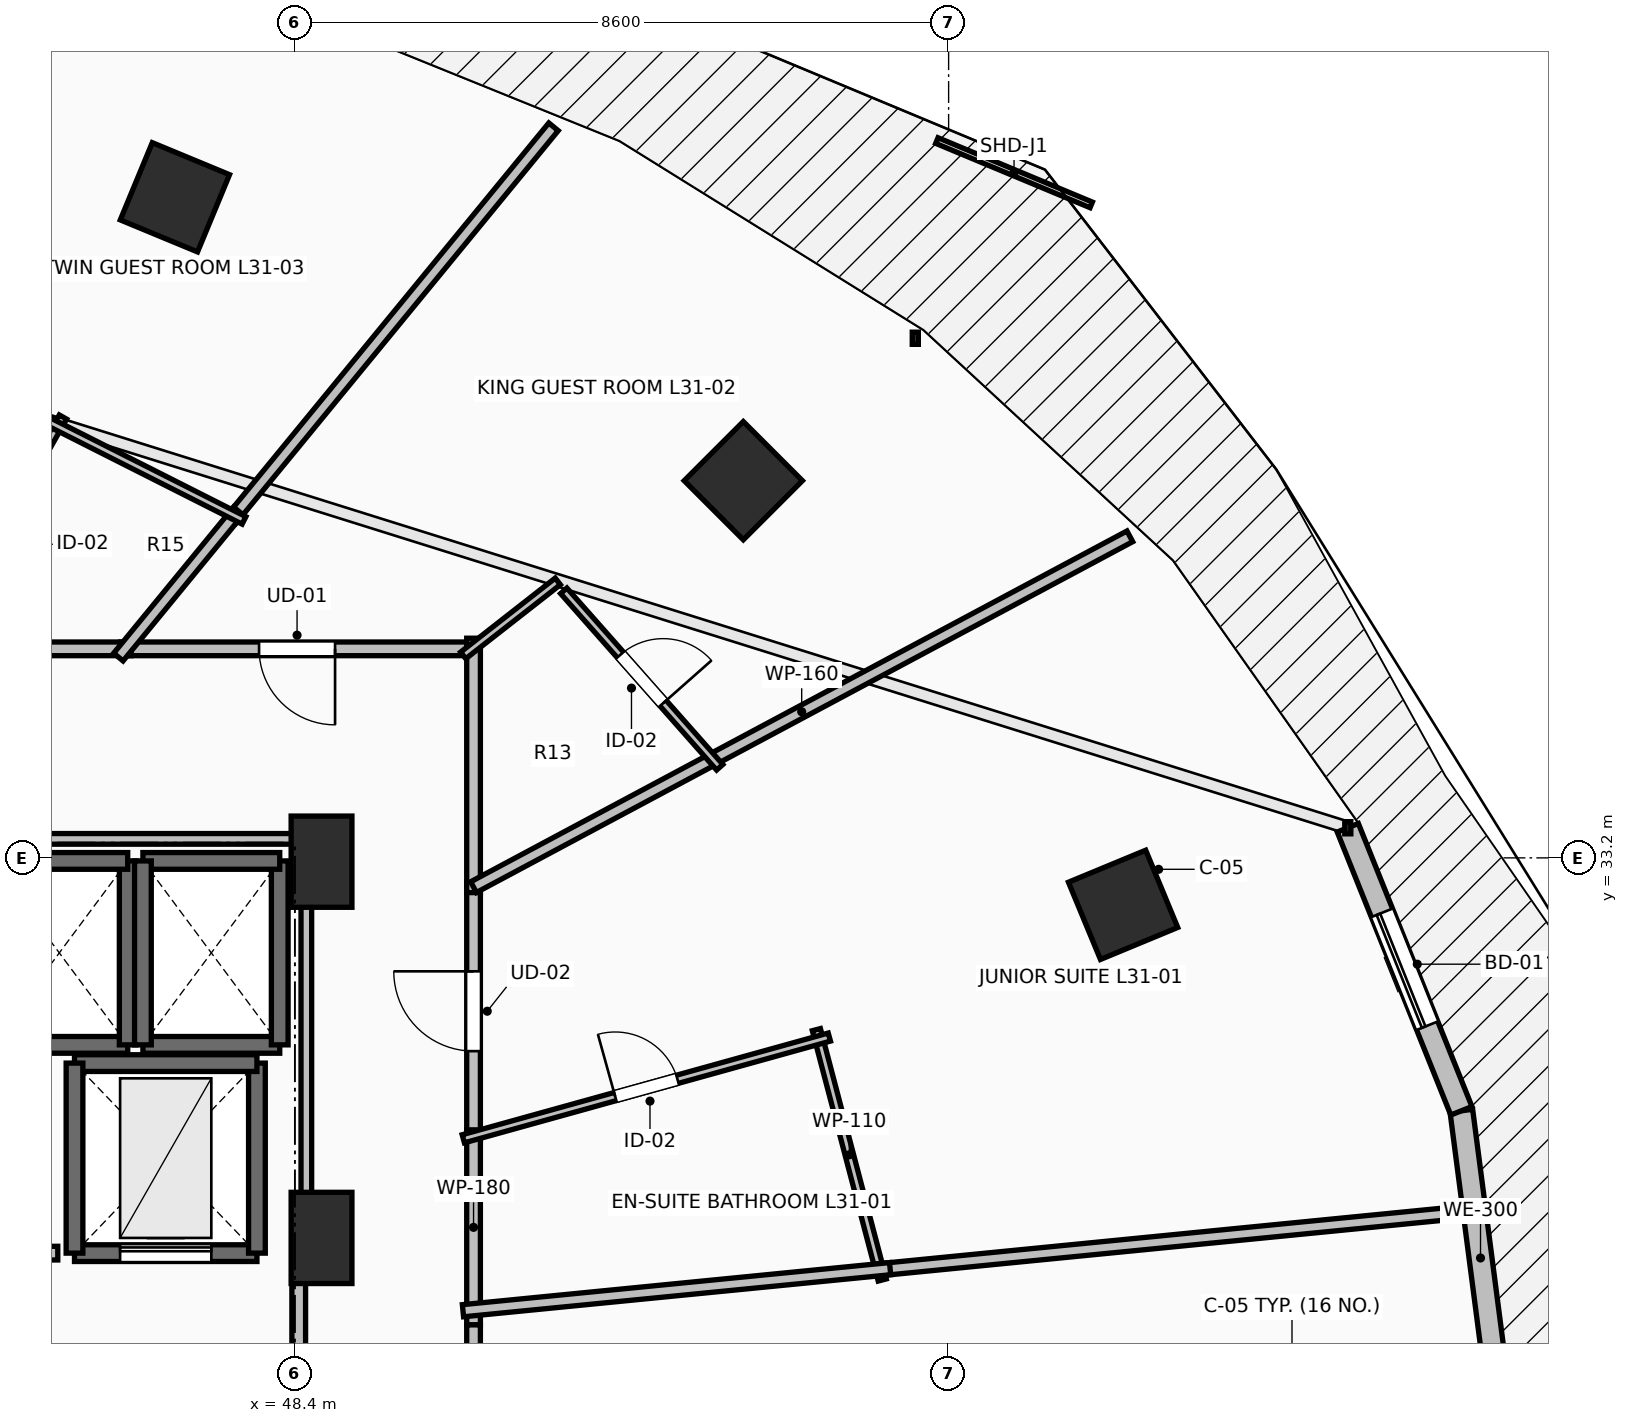
"""IFC4 building model, lengths in metres.
Left out: names, types, materials, properties, quantities, classifications, styles, units other than length and angle.
Written with IfcOpenShell. Run it as: python <this file> out.ifc"""

import sys

from ifc_helpers import new_model, si_unit, direction, frame, frame_2d, origin, origin_2d, place, context, subcontext, project, spatial, rectangle, extrude, element, fill, save


model = new_model("IFC4")
c1 = context("Model", 3, precision=1e-05, world=origin(), true_north=direction((0.0, 1.0)))
c2 = subcontext(c1, "Body", "Model", "MODEL_VIEW")
j1 = project(units=[si_unit("LENGTHUNIT", "METRE"), si_unit("PLANEANGLEUNIT", "RADIAN")], contexts=[c1])
p1 = place(None, origin())
s1 = spatial("IfcSite", under=j1, at=p1, CompositionType="ELEMENT")
p2 = place(p1, origin())
s2 = spatial("IfcBuilding", under=s1, at=p2, CompositionType="ELEMENT")
p3 = place(p2, frame((0.0, 0.0, 117.3)))
s3 = spatial("IfcBuildingStorey", under=s2, at=p3, CompositionType="ELEMENT", Elevation=117.3)
for number, where, z_axis, x_axis in (
    (1, (59.295, 32.582, 0.0), (0.0, 0.0, 1.0), (0.924, 0.383, 0.0)),
    (2, (54.299, 38.162, 0.0), (0.0, 0.0, 1.0), (0.707, 0.707, 0.0)),
    (3, (46.821, 41.891, 0.0), (0.0, 0.0, 1.0), (0.383, 0.924, 0.0)),
):
    element("IfcColumn", number, at=place(p3, frame(where, z_axis=z_axis, x_axis=x_axis)), inside=s3, PredefinedType="COLUMN", context=c2, shape_type="SweptSolid", body=[
        extrude(rectangle(XDim=1.1, YDim=1.1, at=origin_2d()), origin(), (0.0, 0.0, 1.0), 3.5),
    ])
for number, where, z_axis, x_axis in (
    (4, (48.75, 33.15, 0.0), (0.0, 0.0, 1.0), (1.0, 0.0, 0.0)),
    (5, (48.75, 28.2, 0.0), (0.0, 0.0, 1.0), (1.0, 0.0, 0.0)),
):
    element("IfcColumn", number, at=place(p3, frame(where, z_axis=z_axis, x_axis=x_axis)), inside=s3, PredefinedType="PILASTER", context=c2, shape_type="SweptSolid", body=[
        extrude(rectangle(XDim=0.8, YDim=1.2, at=origin_2d()), origin(), (0.0, 0.0, 1.0), 3.5),
    ])
p4 = place(p3, frame((64.25, 26.0, 0.0), z_axis=(0.0, 0.0, 1.0), x_axis=(-0.129157444793, 0.991624099372, 0.0)))
e6 = element("IfcWall", 6, at=p4, inside=s3, PredefinedType="STANDARD", context=c2, shape_type="SweptSolid", body=[
    extrude(rectangle(XDim=3.905, YDim=0.3, at=frame_2d((1.953, 0.0))), origin(), (0.0, 0.0, 1.0), 3.24),
])
p5 = place(p3, frame((63.746, 29.873, 0.0), z_axis=(0.0, 0.0, 1.0), x_axis=(-0.372345205928, 0.92809430966, 0.0)))
e7 = element("IfcWall", 7, at=p5, inside=s3, PredefinedType="STANDARD", context=c2, shape_type="SweptSolid", body=[
    extrude(rectangle(XDim=4.012, YDim=0.3, at=frame_2d((2.006, 0.0))), origin(), (0.0, 0.0, 1.0), 3.24),
])
p6 = place(p5, frame((1.206, 0.0, 0.0)))
e8 = element("IfcOpeningElement", 8, at=p6, cuts=e7, PredefinedType="OPENING", context=c2, shape_type="SweptSolid", body=[
    extrude(rectangle(XDim=1.6, YDim=2.3, at=frame_2d((0.8, 1.15))), frame((0.0, 0.165, 0.0), z_axis=(0.0, -1.0, 0.0), x_axis=(1.0, 0.0, 0.0)), (0.0, 0.0, 1.0), 0.33),
])
p7 = place(p3, frame((44.4, 30.74, 0.0), z_axis=(0.0, 0.0, 1.0), x_axis=(1.0, 0.0, 0.0)))
e9 = element("IfcWall", 9, at=p7, inside=s3, PredefinedType="SOLIDWALL", context=c2, shape_type="SweptSolid", body=[
    extrude(rectangle(XDim=1.8, YDim=0.22, at=frame_2d((0.9, 0.0))), origin(), (0.0, 0.0, 1.0), 3.24),
])
p8 = place(p3, frame((46.2, 30.74, 0.0), z_axis=(0.0, 0.0, 1.0), x_axis=(0.0, 1.0, 0.0)))
e10 = element("IfcWall", 10, at=p8, inside=s3, PredefinedType="SOLIDWALL", context=c2, shape_type="SweptSolid", body=[
    extrude(rectangle(XDim=2.42, YDim=0.22, at=frame_2d((1.21, 0.0))), origin(), (0.0, 0.0, 1.0), 3.24),
])
for number, where, z_axis, x_axis in (
    (11, (46.2, 33.16, 0.0), (0.0, 0.0, 1.0), (-1.0, 0.0, 0.0)),
    (12, (46.4, 30.74, 0.0), (0.0, 0.0, 1.0), (1.0, 0.0, 0.0)),
):
    element("IfcWall", number, at=place(p3, frame(where, z_axis=z_axis, x_axis=x_axis)), inside=s3, PredefinedType="SOLIDWALL", context=c2, shape_type="SweptSolid", body=[
        extrude(rectangle(XDim=1.8, YDim=0.22, at=frame_2d((0.9, 0.0))), origin(), (0.0, 0.0, 1.0), 3.24),
    ])
p9 = place(p3, frame((48.2, 30.74, 0.0), z_axis=(0.0, 0.0, 1.0), x_axis=(0.0, 1.0, 0.0)))
e13 = element("IfcWall", 13, at=p9, inside=s3, PredefinedType="SOLIDWALL", context=c2, shape_type="SweptSolid", body=[
    extrude(rectangle(XDim=2.42, YDim=0.22, at=frame_2d((1.21, 0.0))), origin(), (0.0, 0.0, 1.0), 3.24),
])
p10 = place(p3, frame((48.2, 33.16, 0.0), z_axis=(0.0, 0.0, 1.0), x_axis=(-1.0, 0.0, 0.0)))
e14 = element("IfcWall", 14, at=p10, inside=s3, PredefinedType="SOLIDWALL", context=c2, shape_type="SweptSolid", body=[
    extrude(rectangle(XDim=1.8, YDim=0.22, at=frame_2d((0.9, 0.0))), origin(), (0.0, 0.0, 1.0), 3.24),
])
p11 = place(p3, frame((46.4, 33.16, 0.0), z_axis=(0.0, 0.0, 1.0), x_axis=(0.0, -1.0, 0.0)))
e15 = element("IfcWall", 15, at=p11, inside=s3, PredefinedType="SOLIDWALL", context=c2, shape_type="SweptSolid", body=[
    extrude(rectangle(XDim=2.42, YDim=0.22, at=frame_2d((1.21, 0.0))), origin(), (0.0, 0.0, 1.0), 3.24),
])
p12 = place(p3, frame((45.5, 28.0, 0.0), z_axis=(0.0, 0.0, 1.0), x_axis=(1.0, 0.0, 0.0)))
e16 = element("IfcWall", 16, at=p12, inside=s3, PredefinedType="SHEAR", context=c2, shape_type="SweptSolid", body=[
    extrude(rectangle(XDim=2.4, YDim=0.22, at=frame_2d((1.2, 0.0))), origin(), (0.0, 0.0, 1.0), 3.24),
])
p13 = place(p12, frame((0.6, 0.0, 0.0)))
e17 = element("IfcOpeningElement", 17, at=p13, cuts=e16, PredefinedType="OPENING", context=c2, shape_type="SweptSolid", body=[
    extrude(rectangle(XDim=1.2, YDim=2.2, at=frame_2d((0.6, 1.1))), frame((0.0, 0.125, 0.0), z_axis=(0.0, -1.0, 0.0), x_axis=(1.0, 0.0, 0.0)), (0.0, 0.0, 1.0), 0.25),
])
p14 = place(p3, frame((47.9, 28.0, 0.0), z_axis=(0.0, 0.0, 1.0), x_axis=(0.0, 1.0, 0.0)))
e18 = element("IfcWall", 18, at=p14, inside=s3, PredefinedType="SHEAR", context=c2, shape_type="SweptSolid", body=[
    extrude(rectangle(XDim=2.5, YDim=0.22, at=frame_2d((1.25, 0.0))), origin(), (0.0, 0.0, 1.0), 3.24),
])
p15 = place(p3, frame((47.9, 30.5, 0.0), z_axis=(0.0, 0.0, 1.0), x_axis=(-1.0, 0.0, 0.0)))
e19 = element("IfcWall", 19, at=p15, inside=s3, PredefinedType="SHEAR", context=c2, shape_type="SweptSolid", body=[
    extrude(rectangle(XDim=2.4, YDim=0.22, at=frame_2d((1.2, 0.0))), origin(), (0.0, 0.0, 1.0), 3.24),
])
p16 = place(p3, frame((45.5, 30.5, 0.0), z_axis=(0.0, 0.0, 1.0), x_axis=(0.0, -1.0, 0.0)))
e20 = element("IfcWall", 20, at=p16, inside=s3, PredefinedType="SHEAR", context=c2, shape_type="SweptSolid", body=[
    extrude(rectangle(XDim=2.5, YDim=0.22, at=frame_2d((1.25, 0.0))), origin(), (0.0, 0.0, 1.0), 3.24),
])
p17 = place(p3, frame((48.45, 23.95, 0.0), z_axis=(0.0, 0.0, 1.0), x_axis=(0.0, 1.0, 0.0)))
e21 = element("IfcWall", 21, at=p17, inside=s3, PredefinedType="PARTITIONING", context=c2, shape_type="SweptSolid", body=[
    extrude(rectangle(XDim=4.05, YDim=0.18, at=frame_2d((2.025, 0.0))), origin(), (0.0, 0.0, 1.0), 3.24),
])
p18 = place(p17, frame((1.425, 0.0, 0.0)))
e22 = element("IfcOpeningElement", 22, at=p18, cuts=e21, PredefinedType="OPENING", context=c2, shape_type="SweptSolid", body=[
    extrude(rectangle(XDim=1.2, YDim=2.15, at=frame_2d((0.6, 1.075))), frame((0.0, 0.105, 0.0), z_axis=(0.0, -1.0, 0.0), x_axis=(1.0, 0.0, 0.0)), (0.0, 0.0, 1.0), 0.21),
])
p19 = place(p3, frame((50.75, 29.482, 0.0), z_axis=(0.0, 0.0, 1.0), x_axis=(0.0, 1.0, 0.0)))
e23 = element("IfcWall", 23, at=p19, inside=s3, PredefinedType="PARTITIONING", context=c2, shape_type="SweptSolid", body=[
    extrude(rectangle(XDim=3.401, YDim=0.18, at=frame_2d((1.701, 0.0))), origin(), (0.0, 0.0, 1.0), 2.432),
])
p20 = place(p19, frame((1.176, 0.0, 0.0)))
e24 = element("IfcOpeningElement", 24, at=p20, cuts=e23, PredefinedType="OPENING", context=c2, shape_type="SweptSolid", body=[
    extrude(rectangle(XDim=1.05, YDim=2.2, at=frame_2d((0.525, 1.1))), frame((0.0, 0.105, 0.0), z_axis=(0.0, -1.0, 0.0), x_axis=(1.0, 0.0, 0.0)), (0.0, 0.0, 1.0), 0.21),
])
p21 = place(p3, frame((50.75, 27.056, 0.0), z_axis=(0.0, 0.0, 1.0), x_axis=(0.0, 1.0, 0.0)))
e25 = element("IfcWall", 25, at=p21, inside=s3, PredefinedType="PARTITIONING", context=c2, shape_type="SweptSolid", body=[
    extrude(rectangle(XDim=2.566, YDim=0.18, at=frame_2d((1.283, 0.0))), origin(), (0.0, 0.0, 1.0), 2.432),
])
p22 = place(p3, frame((50.75, 35.95, 0.0), z_axis=(0.0, 0.0, 1.0), x_axis=(-1.0, 0.0, 0.0)))
e26 = element("IfcWall", 26, at=p22, inside=s3, PredefinedType="PARTITIONING", context=c2, shape_type="SweptSolid", body=[
    extrude(rectangle(XDim=4.644, YDim=0.18, at=frame_2d((2.322, 0.0))), origin(), (0.0, 0.0, 1.0), 2.432),
])
p23 = place(p22, frame((1.822, 0.0, 0.0)))
e27 = element("IfcOpeningElement", 27, at=p23, cuts=e26, PredefinedType="OPENING", context=c2, shape_type="SweptSolid", body=[
    extrude(rectangle(XDim=1.0, YDim=2.15, at=frame_2d((0.5, 1.075))), frame((0.0, 0.105, 0.0), z_axis=(0.0, -1.0, 0.0), x_axis=(1.0, 0.0, 0.0)), (0.0, 0.0, 1.0), 0.21),
])
p24 = place(p3, frame((50.75, 32.743, 0.0), z_axis=(0.0, 0.0, 1.0), x_axis=(0.0, 1.0, 0.0)))
e28 = element("IfcWall", 28, at=p24, inside=s3, PredefinedType="PARTITIONING", context=c2, shape_type="SweptSolid", body=[
    extrude(rectangle(XDim=3.347, YDim=0.18, at=frame_2d((1.674, 0.0))), origin(), (0.0, 0.0, 1.0), 2.432),
])
p25 = place(p3, frame((46.246, 35.95, 0.0), z_axis=(0.0, 0.0, 1.0), x_axis=(-1.0, 0.0, 0.0)))
e29 = element("IfcWall", 29, at=p25, inside=s3, PredefinedType="PARTITIONING", context=c2, shape_type="SweptSolid", body=[
    extrude(rectangle(XDim=2.693, YDim=0.18, at=frame_2d((1.347, 0.0))), origin(), (0.0, 0.0, 1.0), 2.874),
])
p26 = place(p3, frame((50.75, 15.596, 0.0), z_axis=(0.0, 0.0, 1.0), x_axis=(0.0, 1.0, 0.0)))
e30 = element("IfcWall", 30, at=p26, inside=s3, PredefinedType="PARTITIONING", context=c2, shape_type="SweptSolid", body=[
    extrude(rectangle(XDim=11.46, YDim=0.18, at=frame_2d((5.73, 0.0))), origin(), (0.0, 0.0, 1.0), 2.432),
])
p27 = place(p26, frame((5.23, 0.0, 0.0)))
e31 = element("IfcOpeningElement", 31, at=p27, cuts=e30, PredefinedType="OPENING", context=c2, shape_type="SweptSolid", body=[
    extrude(rectangle(XDim=1.0, YDim=2.15, at=frame_2d((0.5, 1.075))), frame((0.0, 0.105, 0.0), z_axis=(0.0, -1.0, 0.0), x_axis=(1.0, 0.0, 0.0)), (0.0, 0.0, 1.0), 0.21),
])
p28 = place(p3, frame((55.26, 30.94, 0.0), z_axis=(0.0, 0.0, 1.0), x_axis=(0.254323935255, -0.967119090886, 0.0)))
e32 = element("IfcWall", 32, at=p28, inside=s3, PredefinedType="PARTITIONING", context=c2, shape_type="SweptSolid", body=[
    extrude(rectangle(XDim=3.406, YDim=0.11, at=frame_2d((1.703, 0.0))), origin(), (0.0, 0.0, 1.0), 2.929),
])
p29 = place(p3, frame((50.615, 29.504, 0.0), z_axis=(0.0, 0.0, 1.0), x_axis=(0.963498313434, 0.267714400078, 0.0)))
e33 = element("IfcWall", 33, at=p29, inside=s3, PredefinedType="PARTITIONING", context=c2, shape_type="SweptSolid", body=[
    extrude(rectangle(XDim=4.998, YDim=0.11, at=frame_2d((2.499, 0.0))), origin(), (0.0, 0.0, 1.0), 2.874),
])
p30 = place(p29, frame((2.074, 0.0, 0.0)))
e34 = element("IfcOpeningElement", 34, at=p30, cuts=e33, PredefinedType="OPENING", context=c2, shape_type="SweptSolid", body=[
    extrude(rectangle(XDim=0.85, YDim=2.1, at=frame_2d((0.425, 1.05))), frame((0.0, 0.07, 0.0), z_axis=(0.0, -1.0, 0.0), x_axis=(1.0, 0.0, 0.0)), (0.0, 0.0, 1.0), 0.14),
])
p31 = place(p3, frame((59.384, 37.43, 0.0), z_axis=(0.0, 0.0, 1.0), x_axis=(-0.881921122551, -0.471397002109, 0.0)))
e35 = element("IfcWall", 35, at=p31, inside=s3, PredefinedType="PARTITIONING", context=c2, shape_type="SweptSolid", body=[
    extrude(rectangle(XDim=9.79, YDim=0.16, at=frame_2d((4.895, 0.0))), origin(), (0.0, 0.0, 1.0), 2.432),
])
p32 = place(p3, frame((56.091, 27.782, 0.0), z_axis=(0.0, 0.0, 1.0), x_axis=(0.995182127762, 0.098043523927, 0.0)))
e36 = element("IfcWall", 36, at=p32, inside=s3, PredefinedType="PARTITIONING", context=c2, shape_type="SweptSolid", body=[
    extrude(rectangle(XDim=7.864, YDim=0.16, at=frame_2d((3.932, 0.0))), origin(), (0.0, 0.0, 1.0), 2.677),
])
p33 = place(p3, frame((50.611, 27.242, 0.0), z_axis=(0.0, 0.0, 1.0), x_axis=(0.995185043486, 0.098013923607, 0.0)))
e37 = element("IfcWall", 37, at=p33, inside=s3, PredefinedType="PARTITIONING", context=c2, shape_type="SweptSolid", body=[
    extrude(rectangle(XDim=5.647, YDim=0.16, at=frame_2d((2.823, 0.0))), origin(), (0.0, 0.0, 1.0), 2.432),
])
p34 = place(p3, frame((51.936, 36.714, 0.0), z_axis=(0.0, 0.0, 1.0), x_axis=(0.662322264705, -0.749219071885, 0.0)))
e38 = element("IfcWall", 38, at=p34, inside=s3, PredefinedType="PARTITIONING", context=c2, shape_type="SweptSolid", body=[
    extrude(rectangle(XDim=3.099, YDim=0.11, at=frame_2d((1.549, 0.0))), origin(), (0.0, 0.0, 1.0), 2.432),
])
p35 = place(p34, frame((1.125, 0.0, 0.0)))
e39 = element("IfcOpeningElement", 39, at=p35, cuts=e38, PredefinedType="OPENING", context=c2, shape_type="SweptSolid", body=[
    extrude(rectangle(XDim=0.85, YDim=2.1, at=frame_2d((0.425, 1.05))), frame((0.0, 0.07, 0.0), z_axis=(0.0, -1.0, 0.0), x_axis=(1.0, 0.0, 0.0)), (0.0, 0.0, 1.0), 0.14),
])
p36 = place(p3, frame((50.614, 35.864, 0.0), z_axis=(0.0, 0.0, 1.0), x_axis=(0.787635392766, 0.616141613643, 0.0)))
e40 = element("IfcWall", 40, at=p36, inside=s3, PredefinedType="PARTITIONING", context=c2, shape_type="SweptSolid", body=[
    extrude(rectangle(XDim=1.58, YDim=0.11, at=frame_2d((0.79, 0.0))), origin(), (0.0, 0.0, 1.0), 2.929),
])
p37 = place(p3, frame((51.802, 42.818, 0.0), z_axis=(0.0, 0.0, 1.0), x_axis=(-0.634361991629, -0.773036133422, 0.0)))
e41 = element("IfcWall", 41, at=p37, inside=s3, PredefinedType="PARTITIONING", context=c2, shape_type="SweptSolid", body=[
    extrude(rectangle(XDim=6.678, YDim=0.16, at=frame_2d((3.339, 0.0))), origin(), (0.0, 0.0, 1.0), 2.432),
])
p38 = place(p3, frame((47.655, 37.764, 0.0), z_axis=(0.0, 0.0, 1.0), x_axis=(-0.634343688691, -0.773051152653, 0.0)))
e42 = element("IfcWall", 42, at=p38, inside=s3, PredefinedType="PARTITIONING", context=c2, shape_type="SweptSolid", body=[
    extrude(rectangle(XDim=2.487, YDim=0.16, at=frame_2d((1.244, 0.0))), origin(), (0.0, 0.0, 1.0), 2.432),
])
p39 = place(p3, frame((43.555, 35.828, 0.0), z_axis=(0.0, 0.0, 1.0), x_axis=(0.492041800526, 0.870571574619, 0.0)))
e43 = element("IfcWall", 43, at=p39, inside=s3, PredefinedType="PARTITIONING", context=c2, shape_type="SweptSolid", body=[
    extrude(rectangle(XDim=3.644, YDim=0.11, at=frame_2d((1.822, 0.0))), origin(), (0.0, 0.0, 1.0), 2.874),
])
p40 = place(p39, frame((1.397, 0.0, 0.0)))
e44 = element("IfcOpeningElement", 44, at=p40, cuts=e43, PredefinedType="OPENING", context=c2, shape_type="SweptSolid", body=[
    extrude(rectangle(XDim=0.85, YDim=2.1, at=frame_2d((0.425, 1.05))), frame((0.0, 0.07, 0.0), z_axis=(0.0, -1.0, 0.0), x_axis=(1.0, 0.0, 0.0)), (0.0, 0.0, 1.0), 0.14),
])
p41 = place(p3, frame((45.154, 38.941, 0.0), z_axis=(0.0, 0.0, 1.0), x_axis=(0.892575386964, -0.450898190932, 0.0)))
e45 = element("IfcWall", 45, at=p41, inside=s3, PredefinedType="PARTITIONING", context=c2, shape_type="SweptSolid", body=[
    extrude(rectangle(XDim=2.886, YDim=0.11, at=frame_2d((1.443, 0.0))), origin(), (0.0, 0.0, 1.0), 2.432),
])
p42 = place(p3, frame((45.28, 28.0, 0.0), z_axis=(0.0, 0.0, 1.0), x_axis=(-1.0, 0.0, 0.0)))
e46 = element("IfcWall", 46, at=p42, inside=s3, PredefinedType="PARTITIONING", context=c2, shape_type="SweptSolid", body=[
    extrude(rectangle(XDim=0.915, YDim=0.18, at=frame_2d((0.458, 0.0))), origin(), (0.0, 0.0, 1.0), 3.24),
])
p43 = place(p3, frame((44.34, 33.45, 0.0), z_axis=(0.0, 0.0, 1.0), x_axis=(1.0, 0.0, 0.0)))
e47 = element("IfcWall", 47, at=p43, inside=s3, PredefinedType="PARTITIONING", context=c2, shape_type="SweptSolid", body=[
    extrude(rectangle(XDim=4.21, YDim=0.14, at=frame_2d((2.105, 0.0))), origin(), (0.0, 0.0, 1.0), 2.432),
])
p44 = place(p3, frame((48.55, 33.45, 0.0), z_axis=(0.0, 0.0, 1.0), x_axis=(0.0, -1.0, 0.0)))
e48 = element("IfcWall", 48, at=p44, inside=s3, PredefinedType="PARTITIONING", context=c2, shape_type="SweptSolid", body=[
    extrude(rectangle(XDim=5.254, YDim=0.14, at=frame_2d((2.627, 0.0))), origin(), (0.0, 0.0, 1.0), 2.432),
])
p45 = place(p6, origin())
e49 = element("IfcDoor", 49, at=p45, inside=s3, OperationType="SLIDING_TO_LEFT", PredefinedType="DOOR", context=c2, shape_type="SweptSolid", body=[
    extrude(rectangle(XDim=1.6, YDim=2.3, at=frame_2d((0.8, 1.15))), frame((0.0, 0.025, 0.0), z_axis=(0.0, -1.0, 0.0), x_axis=(1.0, 0.0, 0.0)), (0.0, 0.0, 1.0), 0.05),
])
fill(e8, e49)
p46 = place(p13, origin())
e50 = element("IfcDoor", 50, at=p46, inside=s3, OperationType="SLIDING_TO_LEFT", PredefinedType="DOOR", context=c2, shape_type="SweptSolid", body=[
    extrude(rectangle(XDim=1.2, YDim=2.2, at=frame_2d((0.6, 1.1))), frame((0.0, 0.025, 0.0), z_axis=(0.0, -1.0, 0.0), x_axis=(1.0, 0.0, 0.0)), (0.0, 0.0, 1.0), 0.05),
])
fill(e17, e50)
p47 = place(p20, origin())
e51 = element("IfcDoor", 51, at=p47, inside=s3, OperationType="SINGLE_SWING_RIGHT", PredefinedType="DOOR", context=c2, shape_type="SweptSolid", body=[
    extrude(rectangle(XDim=1.05, YDim=2.2, at=frame_2d((0.525, 1.1))), frame((0.0, 0.025, 0.0), z_axis=(0.0, -1.0, 0.0), x_axis=(1.0, 0.0, 0.0)), (0.0, 0.0, 1.0), 0.05),
])
fill(e24, e51)
p48 = place(p23, origin())
e52 = element("IfcDoor", 52, at=p48, inside=s3, OperationType="SINGLE_SWING_LEFT", PredefinedType="DOOR", context=c2, shape_type="SweptSolid", body=[
    extrude(rectangle(XDim=1.0, YDim=2.15, at=frame_2d((0.5, 1.075))), frame((0.0, 0.025, 0.0), z_axis=(0.0, -1.0, 0.0), x_axis=(1.0, 0.0, 0.0)), (0.0, 0.0, 1.0), 0.05),
])
fill(e27, e52)
p49 = place(p30, origin())
e53 = element("IfcDoor", 53, at=p49, inside=s3, OperationType="SINGLE_SWING_LEFT", PredefinedType="DOOR", context=c2, shape_type="SweptSolid", body=[
    extrude(rectangle(XDim=0.85, YDim=2.1, at=frame_2d((0.425, 1.05))), frame((0.0, 0.025, 0.0), z_axis=(0.0, -1.0, 0.0), x_axis=(1.0, 0.0, 0.0)), (0.0, 0.0, 1.0), 0.05),
])
fill(e34, e53)
p50 = place(p35, origin())
e54 = element("IfcDoor", 54, at=p50, inside=s3, OperationType="SINGLE_SWING_RIGHT", PredefinedType="DOOR", context=c2, shape_type="SweptSolid", body=[
    extrude(rectangle(XDim=0.85, YDim=2.1, at=frame_2d((0.425, 1.05))), frame((0.0, 0.025, 0.0), z_axis=(0.0, -1.0, 0.0), x_axis=(1.0, 0.0, 0.0)), (0.0, 0.0, 1.0), 0.05),
])
fill(e39, e54)
save(model, sys.argv[1])
